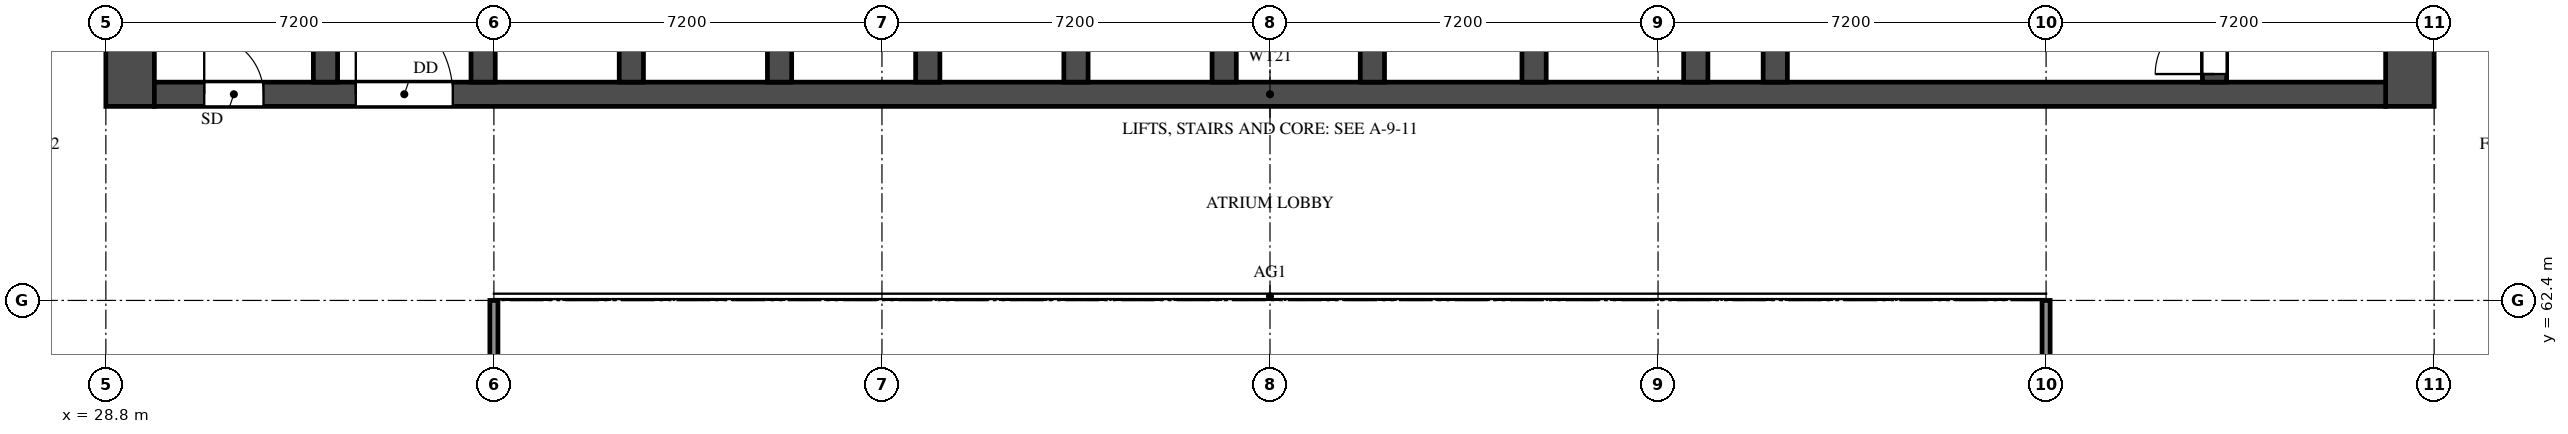
"""IFC4 building model, lengths in metres.
Left out: names, types, materials, properties, quantities, classifications, styles, units other than length and angle.
Written with IfcOpenShell. Run it as: python <this file> out.ifc"""

import sys

from ifc_helpers import new_model, si_unit, direction, frame, frame_2d, origin, place, context, subcontext, project, spatial, rectangle, extrude, element, fill, save


model = new_model("IFC4")
c1 = context("Model", 3, precision=1e-05, world=origin(), true_north=direction((0.0, 1.0)))
c2 = subcontext(c1, "Body", "Model", "MODEL_VIEW")
j1 = project(units=[si_unit("LENGTHUNIT", "METRE"), si_unit("PLANEANGLEUNIT", "RADIAN")], contexts=[c1])
p1 = place(None, origin())
s1 = spatial("IfcSite", under=j1, at=p1, CompositionType="ELEMENT")
p2 = place(p1, origin())
s2 = spatial("IfcBuilding", under=s1, at=p2, CompositionType="ELEMENT")
p3 = place(p2, frame((0.0, 0.0, 69.0)))
s3 = spatial("IfcBuildingStorey", under=s2, at=p3, CompositionType="ELEMENT", Elevation=69.0)
for number, where, z_axis, x_axis in (
    (1, (29.25, 66.0, 0.0), (0.0, 0.0, 1.0), (0.0, 1.0, 0.0)),
    (2, (71.55, 66.0, 0.0), (0.0, 0.0, 1.0), (0.0, 1.0, 0.0)),
):
    element("IfcWall", number, at=place(p3, frame(where, z_axis=z_axis, x_axis=x_axis)), inside=s3, PredefinedType="SHEAR", context=c2, shape_type="SweptSolid", body=[
        extrude(rectangle(XDim=12.0, YDim=0.9, at=frame_2d((6.0, 0.0))), origin(), (0.0, 0.0, 1.0), 3.18),
    ])
p4 = place(p3, frame((29.7, 66.225, 0.0), z_axis=(0.0, 0.0, 1.0), x_axis=(1.0, 0.0, 0.0)))
e3 = element("IfcWall", 3, at=p4, inside=s3, PredefinedType="SHEAR", context=c2, shape_type="SweptSolid", body=[
    extrude(rectangle(XDim=41.4, YDim=0.45, at=frame_2d((20.7, 0.0))), origin(), (0.0, 0.0, 1.0), 3.18),
])
p5 = place(p4, frame((0.925, 0.0, 0.0)))
e4 = element("IfcOpeningElement", 4, at=p5, cuts=e3, PredefinedType="OPENING", context=c2, shape_type="SweptSolid", body=[
    extrude(rectangle(XDim=1.1, YDim=2.1, at=frame_2d((0.55, 1.05))), frame((0.0, 0.235, 0.0), z_axis=(0.0, -1.0, 0.0), x_axis=(1.0, 0.0, 0.0)), (0.0, 0.0, 1.0), 0.47),
])
p6 = place(p4, frame((3.738, 0.0, 0.0)))
e5 = element("IfcOpeningElement", 5, at=p6, cuts=e3, PredefinedType="OPENING", context=c2, shape_type="SweptSolid", body=[
    extrude(rectangle(XDim=1.8, YDim=2.1, at=frame_2d((0.9, 1.05))), frame((0.0, 0.235, 0.0), z_axis=(0.0, -1.0, 0.0), x_axis=(1.0, 0.0, 0.0)), (0.0, 0.0, 1.0), 0.47),
])
p7 = place(p3, frame((32.875, 66.45, 0.0), z_axis=(0.0, 0.0, 1.0), x_axis=(0.0, 1.0, 0.0)))
e6 = element("IfcWall", 6, at=p7, inside=s3, PredefinedType="SHEAR", context=c2, shape_type="SweptSolid", body=[
    extrude(rectangle(XDim=10.65, YDim=0.45, at=frame_2d((5.325, 0.0))), origin(), (0.0, 0.0, 1.0), 3.18),
])
p8 = place(p3, frame((67.925, 66.45, 0.0), z_axis=(0.0, 0.0, 1.0), x_axis=(0.0, 1.0, 0.0)))
e7 = element("IfcWall", 7, at=p8, inside=s3, PredefinedType="SHEAR", context=c2, shape_type="SweptSolid", body=[
    extrude(rectangle(XDim=10.65, YDim=0.45, at=frame_2d((5.325, 0.0))), origin(), (0.0, 0.0, 1.0), 3.18),
])
p9 = place(p8, frame((0.15, 0.0, 0.0)))
e8 = element("IfcOpeningElement", 8, at=p9, cuts=e7, PredefinedType="OPENING", context=c2, shape_type="SweptSolid", body=[
    extrude(rectangle(XDim=1.1, YDim=2.1, at=frame_2d((0.55, 1.05))), frame((0.0, 0.235, 0.0), z_axis=(0.0, -1.0, 0.0), x_axis=(1.0, 0.0, 0.0)), (0.0, 0.0, 1.0), 0.47),
])
p10 = place(p3, frame((59.775, 66.45, 0.0), z_axis=(0.0, 0.0, 1.0), x_axis=(0.0, 1.0, 0.0)))
e9 = element("IfcWall", 9, at=p10, inside=s3, PredefinedType="SHEAR", context=c2, shape_type="SweptSolid", body=[
    extrude(rectangle(XDim=6.025, YDim=0.45, at=frame_2d((3.013, 0.0))), origin(), (0.0, 0.0, 1.0), 3.18),
])
p11 = place(p10, frame((3.85, 0.0, 0.0)))
e10 = element("IfcOpeningElement", 10, at=p11, cuts=e9, PredefinedType="OPENING", context=c2, shape_type="SweptSolid", body=[
    extrude(rectangle(XDim=1.2, YDim=2.1, at=frame_2d((0.6, 1.05))), frame((0.0, 0.235, 0.0), z_axis=(0.0, -1.0, 0.0), x_axis=(1.0, 0.0, 0.0)), (0.0, 0.0, 1.0), 0.47),
])
for number, where, z_axis, x_axis in (
    (11, (35.8, 66.45, 0.0), (0.0, 0.0, 1.0), (0.0, 1.0, 0.0)),
    (12, (38.55, 66.45, 0.0), (0.0, 0.0, 1.0), (0.0, 1.0, 0.0)),
    (13, (41.3, 66.45, 0.0), (0.0, 0.0, 1.0), (0.0, 1.0, 0.0)),
    (14, (44.05, 66.45, 0.0), (0.0, 0.0, 1.0), (0.0, 1.0, 0.0)),
    (15, (46.8, 66.45, 0.0), (0.0, 0.0, 1.0), (0.0, 1.0, 0.0)),
    (16, (49.55, 66.45, 0.0), (0.0, 0.0, 1.0), (0.0, 1.0, 0.0)),
    (17, (52.3, 66.45, 0.0), (0.0, 0.0, 1.0), (0.0, 1.0, 0.0)),
    (18, (55.3, 66.45, 0.0), (0.0, 0.0, 1.0), (0.0, 1.0, 0.0)),
    (19, (58.3, 66.45, 0.0), (0.0, 0.0, 1.0), (0.0, 1.0, 0.0)),
):
    element("IfcWall", number, at=place(p3, frame(where, z_axis=z_axis, x_axis=x_axis)), inside=s3, PredefinedType="SHEAR", context=c2, shape_type="SweptSolid", body=[
        extrude(rectangle(XDim=2.425, YDim=0.45, at=frame_2d((1.212, 0.0))), origin(), (0.0, 0.0, 1.0), 3.18),
    ])
for number, where, z_axis, x_axis in (
    (20, (36.0, 48.0, 0.0), (0.0, 0.0, 1.0), (0.0, 1.0, 0.0)),
    (21, (64.8, 48.0, 0.0), (0.0, 0.0, 1.0), (0.0, 1.0, 0.0)),
):
    element("IfcWall", number, at=place(p3, frame(where, z_axis=z_axis, x_axis=x_axis)), inside=s3, PredefinedType="SOLIDWALL", context=c2, shape_type="SweptSolid", body=[
        extrude(rectangle(XDim=14.4, YDim=0.15, at=frame_2d((7.2, 0.0))), origin(), (0.0, 0.0, 1.0), 2.28),
    ])
p12 = place(p5, origin())
e22 = element("IfcDoor", 22, at=p12, inside=s3, OperationType="SINGLE_SWING_LEFT", PredefinedType="DOOR", context=c2, shape_type="SweptSolid", body=[
    extrude(rectangle(XDim=1.1, YDim=2.1, at=frame_2d((0.55, 1.05))), frame((0.0, 0.025, 0.0), z_axis=(0.0, -1.0, 0.0), x_axis=(1.0, 0.0, 0.0)), (0.0, 0.0, 1.0), 0.05),
])
fill(e4, e22)
p13 = place(p9, origin())
e23 = element("IfcDoor", 23, at=p13, inside=s3, OperationType="SINGLE_SWING_LEFT", PredefinedType="DOOR", context=c2, shape_type="SweptSolid", body=[
    extrude(rectangle(XDim=1.1, YDim=2.1, at=frame_2d((0.55, 1.05))), frame((0.0, 0.025, 0.0), z_axis=(0.0, -1.0, 0.0), x_axis=(1.0, 0.0, 0.0)), (0.0, 0.0, 1.0), 0.05),
])
fill(e8, e23)
p14 = place(p6, origin())
e24 = element("IfcDoor", 24, at=p14, inside=s3, OperationType="DOUBLE_DOOR_SINGLE_SWING", PredefinedType="DOOR", context=c2, shape_type="SweptSolid", body=[
    extrude(rectangle(XDim=1.8, YDim=2.1, at=frame_2d((0.9, 1.05))), frame((0.0, 0.025, 0.0), z_axis=(0.0, -1.0, 0.0), x_axis=(1.0, 0.0, 0.0)), (0.0, 0.0, 1.0), 0.05),
])
fill(e5, e24)
save(model, sys.argv[1])
